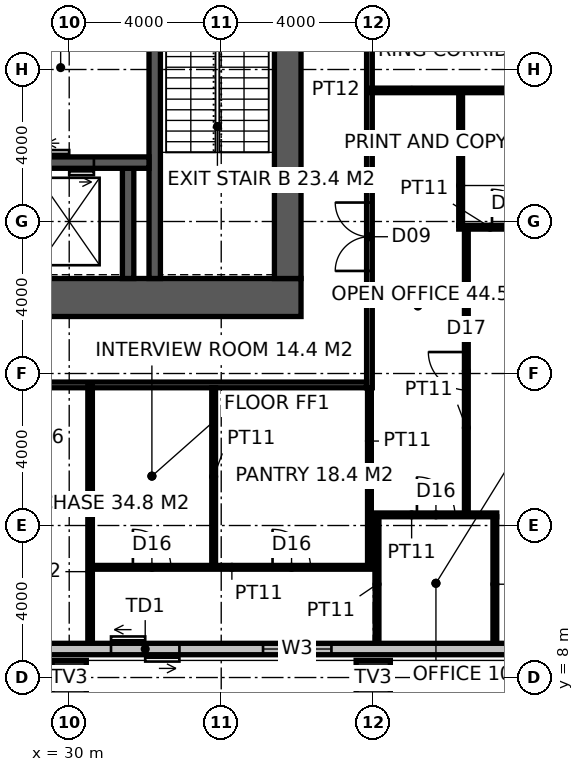
"""IFC4 building model, lengths in metres.
Left out: names, types, materials, properties, quantities, classifications, styles, units other than length and angle.
Written with IfcOpenShell. Run it as: python <this file> out.ifc"""

import sys

from ifc_helpers import new_model, si_unit, direction, frame, frame_2d, origin, origin_2d, place, context, subcontext, project, spatial, rectangle, hollow_rectangle, extrude, element, fill, save


model = new_model("IFC4")
c1 = context("Model", 3, precision=1e-05, world=origin(), true_north=direction((0.0, 1.0)))
c2 = subcontext(c1, "Body", "Model", "MODEL_VIEW")
j1 = project(units=[si_unit("LENGTHUNIT", "METRE"), si_unit("PLANEANGLEUNIT", "RADIAN")], contexts=[c1])
p1 = place(None, origin())
s1 = spatial("IfcSite", under=j1, at=p1, CompositionType="ELEMENT")
p2 = place(p1, origin())
s2 = spatial("IfcBuilding", under=s1, at=p2, CompositionType="ELEMENT")
p3 = place(p2, frame((0.0, 0.0, 171.8)))
s3 = spatial("IfcBuildingStorey", under=s2, at=p3, CompositionType="ELEMENT", Elevation=171.8)
for number, where, z_axis, x_axis in (
    (1, (30.0, 8.0, 0.0), (0.0, 0.0, 1.0), (1.0, 0.0, 0.0)),
    (2, (38.0, 8.0, 0.0), (0.0, 0.0, 1.0), (1.0, 0.0, 0.0)),
):
    element("IfcColumn", number, at=place(p3, frame(where, z_axis=z_axis, x_axis=x_axis)), inside=s3, PredefinedType="USERDEFINED", context=c2, shape_type="SweptSolid", body=[
        extrude(hollow_rectangle(XDim=0.9, YDim=0.9, WallThickness=0.08, at=origin_2d()), origin(), (0.0, 0.0, 1.0), 4.0),
    ])
p4 = place(p3, frame((18.5, 18.0, -0.15), z_axis=(0.0, 0.0, 1.0), x_axis=(1.0, 0.0, 0.0)))
e3 = element("IfcWall", 3, at=p4, inside=s3, PredefinedType="SHEAR", context=c2, shape_type="SweptSolid", body=[
    extrude(rectangle(XDim=17.6, YDim=1.0, at=frame_2d((8.8, 0.0))), origin(), (0.0, 0.0, 1.0), 4.0),
])
p5 = place(p4, frame((3.45, 0.0, 0.15)))
e4 = element("IfcOpeningElement", 4, at=p5, cuts=e3, PredefinedType="OPENING", context=c2, shape_type="SweptSolid", body=[
    extrude(rectangle(XDim=1.5, YDim=2.4, at=frame_2d((0.75, 1.2))), frame((0.0, 0.51, 0.0), z_axis=(0.0, -1.0, 0.0), x_axis=(1.0, 0.0, 0.0)), (0.0, 0.0, 1.0), 1.02),
])
p6 = place(p3, frame((35.75, 18.5, -0.15), z_axis=(0.0, 0.0, 1.0), x_axis=(0.0, 1.0, 0.0)))
e5 = element("IfcWall", 5, at=p6, inside=s3, PredefinedType="SHEAR", context=c2, shape_type="SweptSolid", body=[
    extrude(rectangle(XDim=17.0, YDim=0.7, at=frame_2d((8.5, 0.0))), origin(), (0.0, 0.0, 1.0), 4.0),
])
p7 = place(p6, frame((9.85, 0.0, 0.15)))
e6 = element("IfcOpeningElement", 6, at=p7, cuts=e5, PredefinedType="OPENING", context=c2, shape_type="SweptSolid", body=[
    extrude(rectangle(XDim=1.0, YDim=2.2, at=frame_2d((0.5, 1.1))), frame((0.0, 0.36, 0.0), z_axis=(0.0, -1.0, 0.0), x_axis=(1.0, 0.0, 0.0)), (0.0, 0.0, 1.0), 0.72),
])
p8 = place(p3, frame((32.25, 18.5, -0.15), z_axis=(0.0, 0.0, 1.0), x_axis=(0.0, 1.0, 0.0)))
e7 = element("IfcWall", 7, at=p8, inside=s3, PredefinedType="SHEAR", context=c2, shape_type="SweptSolid", body=[
    extrude(rectangle(XDim=7.9, YDim=0.3, at=frame_2d((3.95, 0.0))), origin(), (0.0, 0.0, 1.0), 4.0),
])
p9 = place(p3, frame((31.55, 18.5, -0.15), z_axis=(0.0, 0.0, 1.0), x_axis=(0.0, 1.0, 0.0)))
e8 = element("IfcWall", 8, at=p9, inside=s3, PredefinedType="SHEAR", context=c2, shape_type="SweptSolid", body=[
    extrude(rectangle(XDim=2.9, YDim=0.3, at=frame_2d((1.45, 0.0))), origin(), (0.0, 0.0, 1.0), 4.0),
])
p10 = place(p3, frame((28.3, 21.55, -0.15), z_axis=(0.0, 0.0, 1.0), x_axis=(1.0, 0.0, 0.0)))
e9 = element("IfcWall", 9, at=p10, inside=s3, PredefinedType="SHEAR", context=c2, shape_type="SweptSolid", body=[
    extrude(rectangle(XDim=3.8, YDim=0.3, at=frame_2d((1.9, 0.0))), origin(), (0.0, 0.0, 1.0), 4.0),
])
p11 = place(p10, frame((1.05, 0.0, 0.15)))
e10 = element("IfcOpeningElement", 10, at=p11, cuts=e9, PredefinedType="OPENING", context=c2, shape_type="SweptSolid", body=[
    extrude(rectangle(XDim=1.3, YDim=2.4, at=frame_2d((0.65, 1.2))), frame((0.0, 0.16, 0.0), z_axis=(0.0, -1.0, 0.0), x_axis=(1.0, 0.0, 0.0)), (0.0, 0.0, 1.0), 0.32),
])
p12 = place(p3, frame((37.9, 15.625, 0.0), z_axis=(0.0, 0.0, 1.0), x_axis=(0.0, 1.0, 0.0)))
e11 = element("IfcWall", 11, at=p12, inside=s3, PredefinedType="PARTITIONING", context=c2, shape_type="SweptSolid", body=[
    extrude(rectangle(XDim=22.75, YDim=0.15, at=frame_2d((11.375, 0.0))), origin(), (0.0, 0.0, 1.0), 2.65),
])
p13 = place(p12, frame((3.074, 0.0, 0.0)))
e12 = element("IfcOpeningElement", 12, at=p13, cuts=e11, PredefinedType="OPENING", context=c2, shape_type="SweptSolid", body=[
    extrude(rectangle(XDim=1.8, YDim=2.4, at=frame_2d((0.9, 1.2))), frame((0.0, 0.085, 0.0), z_axis=(0.0, -1.0, 0.0), x_axis=(1.0, 0.0, 0.0)), (0.0, 0.0, 1.0), 0.17),
])
p14 = place(p12, frame((16.876, 0.0, 0.0)))
e13 = element("IfcOpeningElement", 13, at=p14, cuts=e11, PredefinedType="OPENING", context=c2, shape_type="SweptSolid", body=[
    extrude(rectangle(XDim=1.8, YDim=2.4, at=frame_2d((0.9, 1.2))), frame((0.0, 0.085, 0.0), z_axis=(0.0, -1.0, 0.0), x_axis=(1.0, 0.0, 0.0)), (0.0, 0.0, 1.0), 0.17),
])
p15 = place(p12, frame((9.875, 0.0, 0.0)))
e14 = element("IfcOpeningElement", 14, at=p15, cuts=e11, PredefinedType="OPENING", context=c2, shape_type="SweptSolid", body=[
    extrude(rectangle(XDim=1.0, YDim=2.2, at=frame_2d((0.5, 1.1))), frame((0.0, 0.085, 0.0), z_axis=(0.0, -1.0, 0.0), x_axis=(1.0, 0.0, 0.0)), (0.0, 0.0, 1.0), 0.17),
])
p16 = place(p3, frame((15.775, 15.7, 0.0), z_axis=(0.0, 0.0, 1.0), x_axis=(1.0, 0.0, 0.0)))
e15 = element("IfcWall", 15, at=p16, inside=s3, PredefinedType="PARTITIONING", context=c2, shape_type="SweptSolid", body=[
    extrude(rectangle(XDim=22.05, YDim=0.15, at=frame_2d((11.025, 0.0))), origin(), (0.0, 0.0, 1.0), 3.85),
])
p17 = place(p16, frame((11.725, 0.0, 0.0)))
e16 = element("IfcOpeningElement", 16, at=p17, cuts=e15, PredefinedType="OPENING", context=c2, shape_type="SweptSolid", body=[
    extrude(rectangle(XDim=1.0, YDim=2.2, at=frame_2d((0.5, 1.1))), frame((0.0, 0.085, 0.0), z_axis=(0.0, -1.0, 0.0), x_axis=(1.0, 0.0, 0.0)), (0.0, 0.0, 1.0), 0.17),
])
p18 = place(p3, frame((30.55, 8.68, 0.0), z_axis=(0.0, 0.0, 1.0), x_axis=(0.0, 1.0, 0.0)))
e17 = element("IfcWall", 17, at=p18, inside=s3, PredefinedType="PARTITIONING", context=c2, shape_type="SweptSolid", body=[
    extrude(rectangle(XDim=7.02, YDim=0.12, at=frame_2d((3.51, 0.0))), origin(), (0.0, 0.0, 1.0), 2.65),
])
p19 = place(p3, frame((37.9, 23.45, 0.0), z_axis=(0.0, 0.0, 1.0), x_axis=(1.0, 0.0, 0.0)))
e18 = element("IfcWall", 18, at=p19, inside=s3, PredefinedType="PARTITIONING", context=c2, shape_type="SweptSolid", body=[
    extrude(rectangle(XDim=7.42, YDim=0.12, at=frame_2d((3.71, 0.0))), origin(), (0.0, 0.0, 1.0), 2.65),
])
p20 = place(p3, frame((30.611, 10.9, 0.0), z_axis=(0.0, 0.0, 1.0), x_axis=(1.0, 0.0, 0.0)))
e19 = element("IfcWall", 19, at=p20, inside=s3, PredefinedType="PARTITIONING", context=c2, shape_type="SweptSolid", body=[
    extrude(rectangle(XDim=7.339, YDim=0.1, at=frame_2d((3.669, 0.0))), origin(), (0.0, 0.0, 1.0), 3.85),
])
p21 = place(p20, frame((1.065, 0.0, 0.0)))
e20 = element("IfcOpeningElement", 20, at=p21, cuts=e19, PredefinedType="OPENING", context=c2, shape_type="SweptSolid", body=[
    extrude(rectangle(XDim=1.0, YDim=2.2, at=frame_2d((0.5, 1.1))), frame((0.0, 0.06, 0.0), z_axis=(0.0, -1.0, 0.0), x_axis=(1.0, 0.0, 0.0)), (0.0, 0.0, 1.0), 0.12),
])
p22 = place(p20, frame((4.74, 0.0, 0.0)))
e21 = element("IfcOpeningElement", 21, at=p22, cuts=e19, PredefinedType="OPENING", context=c2, shape_type="SweptSolid", body=[
    extrude(rectangle(XDim=1.0, YDim=2.2, at=frame_2d((0.5, 1.1))), frame((0.0, 0.06, 0.0), z_axis=(0.0, -1.0, 0.0), x_axis=(1.0, 0.0, 0.0)), (0.0, 0.0, 1.0), 0.12),
])
p23 = place(p3, frame((38.05, 12.28, 0.0), z_axis=(0.0, 0.0, 1.0), x_axis=(1.0, 0.0, 0.0)))
e22 = element("IfcWall", 22, at=p23, inside=s3, PredefinedType="PARTITIONING", context=c2, shape_type="SweptSolid", body=[
    extrude(rectangle(XDim=3.2, YDim=0.1, at=frame_2d((1.6, 0.0))), origin(), (0.0, 0.0, 1.0), 3.85),
])
p24 = place(p23, frame((1.1, 0.0, 0.0)))
e23 = element("IfcOpeningElement", 23, at=p24, cuts=e22, PredefinedType="OPENING", context=c2, shape_type="SweptSolid", body=[
    extrude(rectangle(XDim=1.0, YDim=2.2, at=frame_2d((0.5, 1.1))), frame((0.0, 0.06, 0.0), z_axis=(0.0, -1.0, 0.0), x_axis=(1.0, 0.0, 0.0)), (0.0, 0.0, 1.0), 0.12),
])
p25 = place(p3, frame((40.25, 19.85, 0.0), z_axis=(0.0, 0.0, 1.0), x_axis=(1.0, 0.0, 0.0)))
e24 = element("IfcWall", 24, at=p25, inside=s3, PredefinedType="PARTITIONING", context=c2, shape_type="SweptSolid", body=[
    extrude(rectangle(XDim=2.75, YDim=0.1, at=frame_2d((1.375, 0.0))), origin(), (0.0, 0.0, 1.0), 2.85),
])
p26 = place(p25, frame((0.875, 0.0, 0.0)))
e25 = element("IfcOpeningElement", 25, at=p26, cuts=e24, PredefinedType="OPENING", context=c2, shape_type="SweptSolid", body=[
    extrude(rectangle(XDim=1.0, YDim=2.2, at=frame_2d((0.5, 1.1))), frame((0.0, 0.06, 0.0), z_axis=(0.0, -1.0, 0.0), x_axis=(1.0, 0.0, 0.0)), (0.0, 0.0, 1.0), 0.12),
])
for number, where, z_axis, x_axis in (
    (26, (33.801, 10.95, 0.0), (0.0, 0.0, 1.0), (0.0, 1.0, 0.0)),
    (27, (37.9, 10.95, 0.0), (0.0, 0.0, 1.0), (0.0, 1.0, 0.0)),
):
    element("IfcWall", number, at=place(p3, frame(where, z_axis=z_axis, x_axis=x_axis)), inside=s3, PredefinedType="PARTITIONING", context=c2, shape_type="SweptSolid", body=[
        extrude(rectangle(XDim=4.675, YDim=0.1, at=frame_2d((2.337, 0.0))), origin(), (0.0, 0.0, 1.0), 2.65),
    ])
p27 = place(p3, frame((38.1, 8.68, 0.0), z_axis=(0.0, 0.0, 1.0), x_axis=(0.0, 1.0, 0.0)))
e28 = element("IfcWall", 28, at=p27, inside=s3, PredefinedType="PARTITIONING", context=c2, shape_type="SweptSolid", body=[
    extrude(rectangle(XDim=3.55, YDim=0.1, at=frame_2d((1.775, 0.0))), origin(), (0.0, 0.0, 1.0), 2.65),
])
p28 = place(p3, frame((40.3, 19.9, 0.0), z_axis=(0.0, 0.0, 1.0), x_axis=(0.0, 1.0, 0.0)))
e29 = element("IfcWall", 29, at=p28, inside=s3, PredefinedType="PARTITIONING", context=c2, shape_type="SweptSolid", body=[
    extrude(rectangle(XDim=3.49, YDim=0.1, at=frame_2d((1.745, 0.0))), origin(), (0.0, 0.0, 1.0), 3.85),
])
p29 = place(p3, frame((41.2, 8.68, 0.0), z_axis=(0.0, 0.0, 1.0), x_axis=(0.0, 1.0, 0.0)))
e30 = element("IfcWall", 30, at=p29, inside=s3, PredefinedType="PARTITIONING", context=c2, shape_type="SweptSolid", body=[
    extrude(rectangle(XDim=3.55, YDim=0.1, at=frame_2d((1.775, 0.0))), origin(), (0.0, 0.0, 1.0), 3.85),
])
p30 = place(p3, frame((40.45, 12.33, 0.0), z_axis=(0.0, 0.0, 1.0), x_axis=(0.0, 1.0, 0.0)))
e31 = element("IfcWall", 31, at=p30, inside=s3, PredefinedType="PARTITIONING", context=c2, shape_type="SweptSolid", body=[
    extrude(rectangle(XDim=7.47, YDim=0.1, at=frame_2d((3.735, 0.0))), origin(), (0.0, 0.0, 1.0), 3.85),
])
p31 = place(p30, frame((3.235, 0.0, 0.0)))
e32 = element("IfcOpeningElement", 32, at=p31, cuts=e31, PredefinedType="OPENING", context=c2, shape_type="SweptSolid", body=[
    extrude(rectangle(XDim=1.0, YDim=2.2, at=frame_2d((0.5, 1.1))), frame((0.0, 0.06, 0.0), z_axis=(0.0, -1.0, 0.0), x_axis=(1.0, 0.0, 0.0)), (0.0, 0.0, 1.0), 0.12),
])
p32 = place(p3, frame((9.6, 8.75, 0.0), z_axis=(0.0, 0.0, 1.0), x_axis=(1.0, 0.0, 0.0)))
e33 = element("IfcWall", 33, at=p32, inside=s3, PredefinedType="ELEMENTEDWALL", context=c2, shape_type="SweptSolid", body=[
    extrude(rectangle(XDim=32.8, YDim=0.3, at=frame_2d((16.4, 0.0))), origin(), (0.0, 0.0, 1.0), 3.85),
])
p33 = place(p32, frame((5.5, 0.0, 0.8)))
e34 = element("IfcOpeningElement", 34, at=p33, cuts=e33, PredefinedType="OPENING", context=c2, shape_type="SweptSolid", body=[
    extrude(rectangle(XDim=1.8, YDim=2.4, at=frame_2d((0.9, 1.2))), frame((0.0, 0.16, 0.0), z_axis=(0.0, -1.0, 0.0), x_axis=(1.0, 0.0, 0.0)), (0.0, 0.0, 1.0), 0.32),
])
p34 = place(p32, frame((9.5, 0.0, 0.0)))
e35 = element("IfcOpeningElement", 35, at=p34, cuts=e33, PredefinedType="OPENING", context=c2, shape_type="SweptSolid", body=[
    extrude(rectangle(XDim=1.8, YDim=2.4, at=frame_2d((0.9, 1.2))), frame((0.0, 0.16, 0.0), z_axis=(0.0, -1.0, 0.0), x_axis=(1.0, 0.0, 0.0)), (0.0, 0.0, 1.0), 0.32),
])
p35 = place(p32, frame((13.5, 0.0, 0.8)))
e36 = element("IfcOpeningElement", 36, at=p35, cuts=e33, PredefinedType="OPENING", context=c2, shape_type="SweptSolid", body=[
    extrude(rectangle(XDim=1.8, YDim=2.4, at=frame_2d((0.9, 1.2))), frame((0.0, 0.16, 0.0), z_axis=(0.0, -1.0, 0.0), x_axis=(1.0, 0.0, 0.0)), (0.0, 0.0, 1.0), 0.32),
])
p36 = place(p32, frame((17.2, 0.0, 0.8)))
e37 = element("IfcOpeningElement", 37, at=p36, cuts=e33, PredefinedType="OPENING", context=c2, shape_type="SweptSolid", body=[
    extrude(rectangle(XDim=1.0, YDim=2.4, at=frame_2d((0.5, 1.2))), frame((0.0, 0.16, 0.0), z_axis=(0.0, -1.0, 0.0), x_axis=(1.0, 0.0, 0.0)), (0.0, 0.0, 1.0), 0.32),
])
p37 = place(p32, frame((18.6, 0.0, 0.8)))
e38 = element("IfcOpeningElement", 38, at=p37, cuts=e33, PredefinedType="OPENING", context=c2, shape_type="SweptSolid", body=[
    extrude(rectangle(XDim=1.0, YDim=2.4, at=frame_2d((0.5, 1.2))), frame((0.0, 0.16, 0.0), z_axis=(0.0, -1.0, 0.0), x_axis=(1.0, 0.0, 0.0)), (0.0, 0.0, 1.0), 0.32),
])
p38 = place(p32, frame((21.5, 0.0, 0.0)))
e39 = element("IfcOpeningElement", 39, at=p38, cuts=e33, PredefinedType="OPENING", context=c2, shape_type="SweptSolid", body=[
    extrude(rectangle(XDim=1.8, YDim=2.4, at=frame_2d((0.9, 1.2))), frame((0.0, 0.16, 0.0), z_axis=(0.0, -1.0, 0.0), x_axis=(1.0, 0.0, 0.0)), (0.0, 0.0, 1.0), 0.32),
])
p39 = place(p32, frame((25.5, 0.0, 0.8)))
e40 = element("IfcOpeningElement", 40, at=p39, cuts=e33, PredefinedType="OPENING", context=c2, shape_type="SweptSolid", body=[
    extrude(rectangle(XDim=1.8, YDim=2.4, at=frame_2d((0.9, 1.2))), frame((0.0, 0.16, 0.0), z_axis=(0.0, -1.0, 0.0), x_axis=(1.0, 0.0, 0.0)), (0.0, 0.0, 1.0), 0.32),
])
p40 = place(p13, origin())
e41 = element("IfcDoor", 41, at=p40, inside=s3, OperationType="DOUBLE_DOOR_DOUBLE_SWING", PredefinedType="DOOR", context=c2, shape_type="SweptSolid", body=[
    extrude(rectangle(XDim=1.8, YDim=2.4, at=frame_2d((0.9, 1.2))), frame((0.0, 0.025, 0.0), z_axis=(0.0, -1.0, 0.0), x_axis=(1.0, 0.0, 0.0)), (0.0, 0.0, 1.0), 0.05),
])
fill(e12, e41)
p41 = place(p21, origin())
e42 = element("IfcDoor", 42, at=p41, inside=s3, OperationType="SINGLE_SWING_LEFT", PredefinedType="DOOR", context=c2, shape_type="SweptSolid", body=[
    extrude(rectangle(XDim=1.0, YDim=2.2, at=frame_2d((0.5, 1.1))), frame((0.0, 0.025, 0.0), z_axis=(0.0, -1.0, 0.0), x_axis=(1.0, 0.0, 0.0)), (0.0, 0.0, 1.0), 0.05),
])
fill(e20, e42)
p42 = place(p22, origin())
e43 = element("IfcDoor", 43, at=p42, inside=s3, OperationType="SINGLE_SWING_LEFT", PredefinedType="DOOR", context=c2, shape_type="SweptSolid", body=[
    extrude(rectangle(XDim=1.0, YDim=2.2, at=frame_2d((0.5, 1.1))), frame((0.0, 0.025, 0.0), z_axis=(0.0, -1.0, 0.0), x_axis=(1.0, 0.0, 0.0)), (0.0, 0.0, 1.0), 0.05),
])
fill(e21, e43)
p43 = place(p26, origin())
e44 = element("IfcDoor", 44, at=p43, inside=s3, OperationType="SINGLE_SWING_LEFT", PredefinedType="DOOR", context=c2, shape_type="SweptSolid", body=[
    extrude(rectangle(XDim=1.0, YDim=2.2, at=frame_2d((0.5, 1.1))), frame((0.0, 0.025, 0.0), z_axis=(0.0, -1.0, 0.0), x_axis=(1.0, 0.0, 0.0)), (0.0, 0.0, 1.0), 0.05),
])
fill(e25, e44)
p44 = place(p24, origin())
e45 = element("IfcDoor", 45, at=p44, inside=s3, OperationType="SINGLE_SWING_LEFT", PredefinedType="DOOR", context=c2, shape_type="SweptSolid", body=[
    extrude(rectangle(XDim=1.0, YDim=2.2, at=frame_2d((0.5, 1.1))), frame((0.0, 0.025, 0.0), z_axis=(0.0, -1.0, 0.0), x_axis=(1.0, 0.0, 0.0)), (0.0, 0.0, 1.0), 0.05),
])
fill(e23, e45)
p45 = place(p31, origin())
e46 = element("IfcDoor", 46, at=p45, inside=s3, OperationType="SINGLE_SWING_RIGHT", PredefinedType="DOOR", context=c2, shape_type="SweptSolid", body=[
    extrude(rectangle(XDim=1.0, YDim=2.2, at=frame_2d((0.5, 1.1))), frame((0.0, 0.025, 0.0), z_axis=(0.0, -1.0, 0.0), x_axis=(1.0, 0.0, 0.0)), (0.0, 0.0, 1.0), 0.05),
])
fill(e32, e46)
p46 = place(p11, origin())
e47 = element("IfcDoor", 47, at=p46, inside=s3, OperationType="DOUBLE_DOOR_SLIDING", PredefinedType="DOOR", context=c2, shape_type="SweptSolid", body=[
    extrude(rectangle(XDim=1.3, YDim=2.4, at=frame_2d((0.65, 1.2))), frame((0.0, 0.025, 0.0), z_axis=(0.0, -1.0, 0.0), x_axis=(1.0, 0.0, 0.0)), (0.0, 0.0, 1.0), 0.05),
])
fill(e10, e47)
p47 = place(p38, origin())
e48 = element("IfcDoor", 48, at=p47, inside=s3, OperationType="DOUBLE_DOOR_SLIDING", PredefinedType="DOOR", context=c2, shape_type="SweptSolid", body=[
    extrude(rectangle(XDim=1.8, YDim=2.4, at=frame_2d((0.9, 1.2))), frame((0.0, 0.025, 0.0), z_axis=(0.0, -1.0, 0.0), x_axis=(1.0, 0.0, 0.0)), (0.0, 0.0, 1.0), 0.05),
])
fill(e39, e48)
p48 = place(p39, origin())
e49 = element("IfcWindow", 49, at=p48, inside=s3, PartitioningType="SINGLE_PANEL", PredefinedType="WINDOW", context=c2, shape_type="SweptSolid", body=[
    extrude(rectangle(XDim=1.8, YDim=2.4, at=frame_2d((0.9, 1.2))), frame((0.0, 0.03, 0.0), z_axis=(0.0, -1.0, 0.0), x_axis=(1.0, 0.0, 0.0)), (0.0, 0.0, 1.0), 0.06),
])
fill(e40, e49)
save(model, sys.argv[1])
